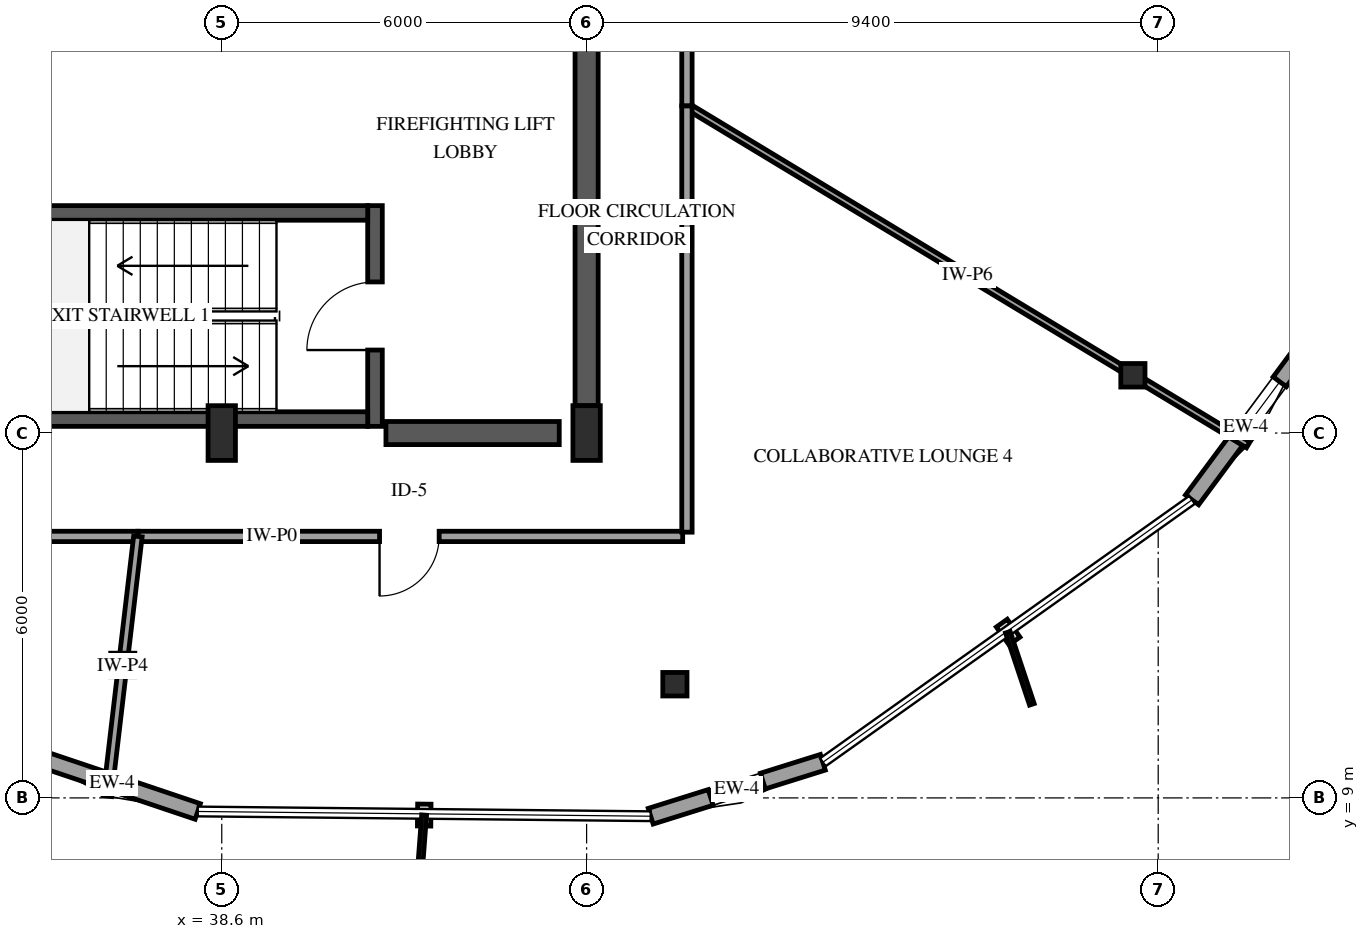
"""IFC4 building model, lengths in metres.
Left out: names, types, materials, properties, quantities, classifications, styles, units other than length and angle.
Written with IfcOpenShell. Run it as: python <this file> out.ifc"""

import sys

from ifc_helpers import new_model, si_unit, direction, frame, frame_2d, origin, origin_2d, place, context, subcontext, project, spatial, rectangle, i_section, extrude, element, fill, save


model = new_model("IFC4")
c1 = context("Model", 3, precision=1e-05, world=origin(), true_north=direction((0.0, 1.0)))
c2 = subcontext(c1, "Body", "Model", "MODEL_VIEW")
j1 = project(units=[si_unit("LENGTHUNIT", "METRE"), si_unit("PLANEANGLEUNIT", "RADIAN")], contexts=[c1])
p1 = place(None, origin())
s1 = spatial("IfcSite", under=j1, at=p1, CompositionType="ELEMENT")
p2 = place(p1, origin())
s2 = spatial("IfcBuilding", under=s1, at=p2, CompositionType="ELEMENT")
p3 = place(p2, frame((0.0, 0.0, 297.25)))
s3 = spatial("IfcBuildingStorey", under=s2, at=p3, CompositionType="ELEMENT", Elevation=297.25)
p4 = place(p3, frame((41.12, 15.11, 0.0), z_axis=(0.0, 0.0, 1.0), x_axis=(0.0, 1.0, 0.0)))
e1 = element("IfcWall", 1, at=p4, inside=s3, PredefinedType="SHEAR", context=c2, shape_type="SweptSolid", body=[
    extrude(rectangle(XDim=3.63, YDim=0.24, at=frame_2d((1.815, 0.0))), origin(), (0.0, 0.0, 1.0), 4.2),
])
p5 = place(p4, frame((1.255, 0.0, 0.0)))
e2 = element("IfcOpeningElement", 2, at=p5, cuts=e1, PredefinedType="OPENING", context=c2, shape_type="SweptSolid", body=[
    extrude(rectangle(XDim=1.12, YDim=2.15, at=frame_2d((0.56, 1.075))), frame((0.0, 0.13, 0.0), z_axis=(0.0, -1.0, 0.0), x_axis=(1.0, 0.0, 0.0)), (0.0, 0.0, 1.0), 0.26),
])
for number, where, z_axis, x_axis in (
    (3, (33.0, 15.23, 0.0), (0.0, 0.0, 1.0), (1.0, 0.0, 0.0)),
    (4, (33.0, 18.62, 0.0), (0.0, 0.0, 1.0), (1.0, 0.0, 0.0)),
):
    element("IfcWall", number, at=place(p3, frame(where, z_axis=z_axis, x_axis=x_axis)), inside=s3, PredefinedType="SHEAR", context=c2, shape_type="SweptSolid", body=[
        extrude(rectangle(XDim=8.0, YDim=0.24, at=frame_2d((4.0, 0.0))), origin(), (0.0, 0.0, 1.0), 4.2),
    ])
p6 = place(p3, frame((41.3, 15.0, 0.0), z_axis=(0.0, 0.0, 1.0), x_axis=(1.0, 0.0, 0.0)))
e5 = element("IfcWall", 5, at=p6, inside=s3, PredefinedType="SHEAR", context=c2, shape_type="SweptSolid", body=[
    extrude(rectangle(XDim=2.85, YDim=0.38, at=frame_2d((1.425, 0.0))), origin(), (0.0, 0.0, 1.0), 4.2),
])
p7 = place(p3, frame((44.6, 15.45, 0.0), z_axis=(0.0, 0.0, 1.0), x_axis=(0.0, 1.0, 0.0)))
e6 = element("IfcWall", 6, at=p7, inside=s3, PredefinedType="SHEAR", context=c2, shape_type="SweptSolid", body=[
    extrude(rectangle(XDim=6.35, YDim=0.38, at=frame_2d((3.175, 0.0))), origin(), (0.0, 0.0, 1.0), 4.2),
])
for number, where, z_axis, x_axis in (
    (7, (38.6, 15.0, 0.0), (0.0, 0.0, 1.0), (1.0, 0.0, 0.0)),
    (8, (44.6, 15.0, 0.0), (0.0, 0.0, 1.0), (1.0, 0.0, 0.0)),
):
    element("IfcColumn", number, at=place(p3, frame(where, z_axis=z_axis, x_axis=x_axis)), inside=s3, PredefinedType="PILASTER", context=c2, shape_type="SweptSolid", body=[
        extrude(rectangle(XDim=0.45, YDim=0.9, at=origin_2d()), origin(), (0.0, 0.0, 1.0), 4.2),
    ])
for number, where, z_axis, x_axis in (
    (9, (36.972, 11.187, 0.0), (0.0, 0.0, 1.0), (1.0, 0.0, 0.0)),
    (10, (46.052, 10.869, 0.0), (0.0, 0.0, 1.0), (1.0, 0.0, 0.0)),
    (11, (53.584, 15.95, 0.0), (0.0, 0.0, 1.0), (1.0, 0.0, 0.0)),
):
    element("IfcColumn", number, at=place(p3, frame(where, z_axis=z_axis, x_axis=x_axis)), inside=s3, PredefinedType="COLUMN", context=c2, shape_type="SweptSolid", body=[
        extrude(i_section(OverallWidth=0.398, OverallDepth=0.387, WebThickness=0.021, FlangeThickness=0.033, FilletRadius=0.038, at=origin_2d()), origin(), (0.0, 0.0, 1.0), 4.2),
    ])
p8 = place(p3, frame((35.394, 9.723, 0.0), z_axis=(0.0, 0.0, 1.0), x_axis=(0.947782395964, -0.31891774786, 0.0)))
e12 = element("IfcWall", 12, at=p8, inside=s3, PredefinedType="SOLIDWALL", context=c2, shape_type="SweptSolid", body=[
    extrude(rectangle(XDim=2.966, YDim=0.27, at=frame_2d((1.483, 0.0))), origin(), (0.0, 0.0, 1.0), 3.274),
])
p9 = place(p3, frame((45.654, 8.699, 0.0), z_axis=(0.0, 0.0, 1.0), x_axis=(0.954232173164, 0.299066814772, 0.0)))
e13 = element("IfcWall", 13, at=p9, inside=s3, PredefinedType="SOLIDWALL", context=c2, shape_type="SweptSolid", body=[
    extrude(rectangle(XDim=2.967, YDim=0.27, at=frame_2d((1.483, 0.0))), origin(), (0.0, 0.0, 1.0), 3.274),
])
p10 = place(p9, frame((1.033, 0.0, 0.75)))
e14 = element("IfcOpeningElement", 14, at=p10, cuts=e13, PredefinedType="OPENING", context=c2, shape_type="SweptSolid", body=[
    extrude(rectangle(XDim=0.9, YDim=1.5, at=frame_2d((0.45, 0.75))), frame((0.0, 0.145, 0.0), z_axis=(0.0, -1.0, 0.0), x_axis=(1.0, 0.0, 0.0)), (0.0, 0.0, 1.0), 0.29),
])
p11 = place(p3, frame((54.557, 13.901, 0.0), z_axis=(0.0, 0.0, 1.0), x_axis=(0.596240662284, 0.802805750253, 0.0)))
e15 = element("IfcWall", 15, at=p11, inside=s3, PredefinedType="SOLIDWALL", context=c2, shape_type="SweptSolid", body=[
    extrude(rectangle(XDim=2.967, YDim=0.27, at=frame_2d((1.483, 0.0))), origin(), (0.0, 0.0, 1.0), 3.274),
])
p12 = place(p11, frame((1.519, 0.0, 0.75)))
e16 = element("IfcOpeningElement", 16, at=p12, cuts=e15, PredefinedType="OPENING", context=c2, shape_type="SweptSolid", body=[
    extrude(rectangle(XDim=0.9, YDim=1.5, at=frame_2d((0.45, 0.75))), frame((0.0, 0.145, 0.0), z_axis=(0.0, -1.0, 0.0), x_axis=(1.0, 0.0, 0.0)), (0.0, 0.0, 1.0), 0.29),
])
p13 = place(p3, frame((46.25, 20.379, 0.0), z_axis=(0.0, 0.0, 1.0), x_axis=(0.856016994911, -0.516947680548, 0.0)))
e17 = element("IfcWall", 17, at=p13, inside=s3, PredefinedType="PARTITIONING", context=c2, shape_type="SweptSolid", body=[
    extrude(rectangle(XDim=10.782, YDim=0.11, at=frame_2d((5.391, 0.0))), origin(), (0.0, 0.0, 1.0), 3.273),
])
p14 = place(p3, frame((46.18, 13.3, 0.0), z_axis=(0.0, 0.0, 1.0), x_axis=(-1.0, 0.0, 0.0)))
e18 = element("IfcWall", 18, at=p14, inside=s3, PredefinedType="PARTITIONING", context=c2, shape_type="SweptSolid", body=[
    extrude(rectangle(XDim=8.959, YDim=0.17, at=frame_2d((4.479, 0.0))), origin(), (0.0, 0.0, 1.0), 3.895),
])
p15 = place(p14, frame((4.005, 0.0, 0.0)))
e19 = element("IfcOpeningElement", 19, at=p15, cuts=e18, PredefinedType="OPENING", context=c2, shape_type="SweptSolid", body=[
    extrude(rectangle(XDim=0.98, YDim=2.15, at=frame_2d((0.49, 1.075))), frame((0.0, 0.095, 0.0), z_axis=(0.0, -1.0, 0.0), x_axis=(1.0, 0.0, 0.0)), (0.0, 0.0, 1.0), 0.19),
])
p16 = place(p3, frame((46.25, 29.035, 0.0), z_axis=(0.0, 0.0, 1.0), x_axis=(0.0, -1.0, 0.0)))
e20 = element("IfcWall", 20, at=p16, inside=s3, PredefinedType="PARTITIONING", context=c2, shape_type="SweptSolid", body=[
    extrude(rectangle(XDim=8.656, YDim=0.17, at=frame_2d((4.328, 0.0))), origin(), (0.0, 0.0, 1.0), 3.895),
])
p17 = place(p16, frame((3.853, 0.0, 0.0)))
e21 = element("IfcOpeningElement", 21, at=p17, cuts=e20, PredefinedType="OPENING", context=c2, shape_type="SweptSolid", body=[
    extrude(rectangle(XDim=0.98, YDim=2.15, at=frame_2d((0.49, 1.075))), frame((0.0, 0.095, 0.0), z_axis=(0.0, -1.0, 0.0), x_axis=(1.0, 0.0, 0.0)), (0.0, 0.0, 1.0), 0.19),
])
p18 = place(p3, frame((46.25, 20.379, 0.0), z_axis=(0.0, 0.0, 1.0), x_axis=(0.0, -1.0, 0.0)))
e22 = element("IfcWall", 22, at=p18, inside=s3, PredefinedType="PARTITIONING", context=c2, shape_type="SweptSolid", body=[
    extrude(rectangle(XDim=7.009, YDim=0.17, at=frame_2d((3.504, 0.0))), origin(), (0.0, 0.0, 1.0), 3.895),
])
p19 = place(p3, frame((37.221, 13.3, 0.0), z_axis=(0.0, 0.0, 1.0), x_axis=(-1.0, 0.0, 0.0)))
e23 = element("IfcWall", 23, at=p19, inside=s3, PredefinedType="PARTITIONING", context=c2, shape_type="SweptSolid", body=[
    extrude(rectangle(XDim=4.551, YDim=0.17, at=frame_2d((2.275, 0.0))), origin(), (0.0, 0.0, 1.0), 3.895),
])
p20 = place(p19, frame((1.8, 0.0, 0.0)))
e24 = element("IfcOpeningElement", 24, at=p20, cuts=e23, PredefinedType="OPENING", context=c2, shape_type="SweptSolid", body=[
    extrude(rectangle(XDim=0.98, YDim=2.15, at=frame_2d((0.49, 1.075))), frame((0.0, 0.095, 0.0), z_axis=(0.0, -1.0, 0.0), x_axis=(1.0, 0.0, 0.0)), (0.0, 0.0, 1.0), 0.19),
])
p21 = place(p3, frame((37.221, 13.3, 0.0), z_axis=(0.0, 0.0, 1.0), x_axis=(-0.116973029666, -0.993135091682, 0.0)))
e25 = element("IfcWall", 25, at=p21, inside=s3, PredefinedType="PARTITIONING", context=c2, shape_type="SweptSolid", body=[
    extrude(rectangle(XDim=4.3, YDim=0.14, at=frame_2d((2.15, 0.0))), origin(), (0.0, 0.0, 1.0), 3.895),
])
p22 = place(p10, origin())
e26 = element("IfcWindow", 26, at=p22, inside=s3, PartitioningType="SINGLE_PANEL", PredefinedType="WINDOW", context=c2, shape_type="SweptSolid", body=[
    extrude(rectangle(XDim=0.9, YDim=1.5, at=frame_2d((0.45, 0.75))), frame((0.0, 0.03, 0.0), z_axis=(0.0, -1.0, 0.0), x_axis=(1.0, 0.0, 0.0)), (0.0, 0.0, 1.0), 0.06),
])
fill(e14, e26)
p23 = place(p12, origin())
e27 = element("IfcWindow", 27, at=p23, inside=s3, PartitioningType="SINGLE_PANEL", PredefinedType="WINDOW", context=c2, shape_type="SweptSolid", body=[
    extrude(rectangle(XDim=0.9, YDim=1.5, at=frame_2d((0.45, 0.75))), frame((0.0, 0.03, 0.0), z_axis=(0.0, -1.0, 0.0), x_axis=(1.0, 0.0, 0.0)), (0.0, 0.0, 1.0), 0.06),
])
fill(e16, e27)
p24 = place(p5, origin())
e28 = element("IfcDoor", 28, at=p24, inside=s3, OperationType="SINGLE_SWING_LEFT", PredefinedType="DOOR", context=c2, shape_type="SweptSolid", body=[
    extrude(rectangle(XDim=1.12, YDim=2.15, at=frame_2d((0.56, 1.075))), frame((0.0, 0.025, 0.0), z_axis=(0.0, -1.0, 0.0), x_axis=(1.0, 0.0, 0.0)), (0.0, 0.0, 1.0), 0.05),
])
fill(e2, e28)
p25 = place(p15, origin())
e29 = element("IfcDoor", 29, at=p25, inside=s3, OperationType="SINGLE_SWING_RIGHT", PredefinedType="DOOR", context=c2, shape_type="SweptSolid", body=[
    extrude(rectangle(XDim=0.98, YDim=2.15, at=frame_2d((0.49, 1.075))), frame((0.0, 0.025, 0.0), z_axis=(0.0, -1.0, 0.0), x_axis=(1.0, 0.0, 0.0)), (0.0, 0.0, 1.0), 0.05),
])
fill(e19, e29)
save(model, sys.argv[1])
